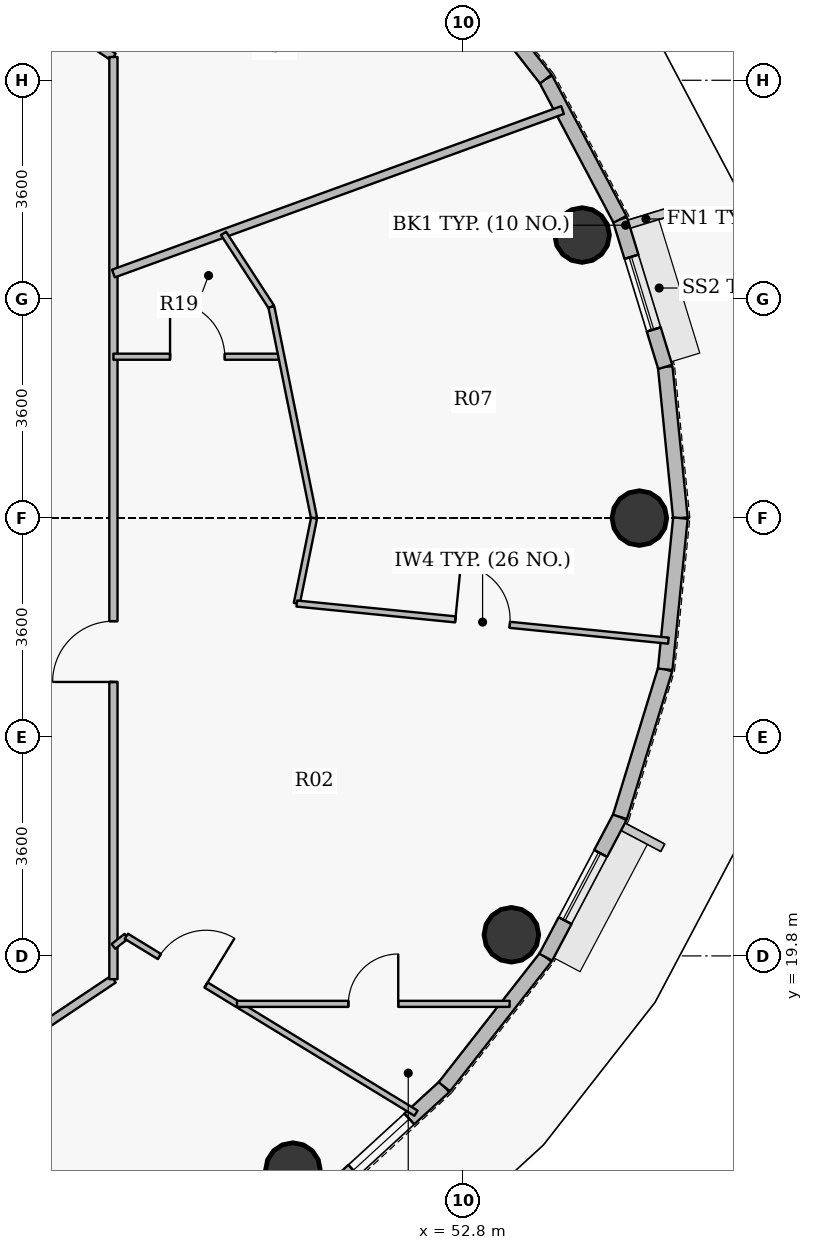
"""IFC4 building model, lengths in metres.
Left out: names, types, materials, properties, quantities, classifications, styles, units other than length and angle.
Written with IfcOpenShell. Run it as: python <this file> out.ifc"""

import sys

from ifc_helpers import new_model, si_unit, direction, frame, frame_2d, origin, origin_2d, place, context, subcontext, project, spatial, rectangle, hollow_circle, extrude, source, transform, mapped, element, fill, save


model = new_model("IFC4")
c1 = context("Model", 3, precision=1e-05, world=origin(), true_north=direction((0.0, 1.0)))
c2 = subcontext(c1, "Body", "Model", "MODEL_VIEW")
j1 = project(units=[si_unit("LENGTHUNIT", "METRE"), si_unit("PLANEANGLEUNIT", "RADIAN")], contexts=[c1])
p1 = place(None, origin())
s1 = spatial("IfcSite", under=j1, at=p1, CompositionType="ELEMENT")
p2 = place(p1, origin())
s2 = spatial("IfcBuilding", under=s1, at=p2, CompositionType="ELEMENT")
p3 = place(p2, frame((0.0, 0.0, 324.0)))
s3 = spatial("IfcBuildingStorey", under=s2, at=p3, CompositionType="ELEMENT", Elevation=324.0)
for number, where, z_axis, x_axis in (
    (1, (55.7, 27.0, -0.25), (0.0, 0.0, 1.0), (1.0, 0.0, 0.0)),
    (2, (54.758, 31.655, -0.25), (0.0, 0.0, 1.0), (1.0, 0.0, 0.0)),
    (3, (50.002, 16.277, -0.25), (0.0, 0.0, 1.0), (1.0, 0.0, 0.0)),
    (4, (53.595, 20.147, -0.25), (0.0, 0.0, 1.0), (1.0, 0.0, 0.0)),
):
    element("IfcColumn", number, at=place(p3, frame(where, z_axis=z_axis, x_axis=x_axis)), inside=s3, PredefinedType="COLUMN", context=c2, shape_type="SweptSolid", body=[
        extrude(hollow_circle(Radius=0.45, WallThickness=0.028, at=origin_2d()), origin(), (0.0, 0.0, 1.0), 4.05),
    ])
p4 = place(p3, frame((56.125, 29.487, 0.0), z_axis=(0.0, 0.0, 1.0), x_axis=(0.100025963401, -0.994984827344, 0.0)))
e5 = element("IfcWall", 5, at=p4, inside=s3, PredefinedType="SOLIDWALL", context=c2, shape_type="SweptSolid", body=[
    extrude(rectangle(XDim=2.499, YDim=0.24, at=frame_2d((1.25, 0.0))), origin(), (0.0, 0.0, 1.0), 3.55),
])
p5 = place(p3, frame((55.381, 31.913, 0.0), z_axis=(0.0, 0.0, 1.0), x_axis=(0.293105547213, -0.956080089842, 0.0)))
e6 = element("IfcWall", 6, at=p5, inside=s3, PredefinedType="SOLIDWALL", context=c2, shape_type="SweptSolid", body=[
    extrude(rectangle(XDim=2.538, YDim=0.24, at=frame_2d((1.269, 0.0))), origin(), (0.0, 0.0, 1.0), 3.55),
])
p6 = place(p5, frame((0.644, 0.0, 0.9)))
e7 = element("IfcOpeningElement", 7, at=p6, cuts=e6, PredefinedType="OPENING", context=c2, shape_type="SweptSolid", body=[
    extrude(rectangle(XDim=1.25, YDim=1.65, at=origin_2d()), frame((0.625, 0.13, 0.825), z_axis=(0.0, -1.0, 0.0), x_axis=(1.0, 0.0, 0.0)), (0.0, 0.0, 1.0), 0.26),
])
p7 = place(p3, frame((54.161, 34.221, 0.0), z_axis=(0.0, 0.0, 1.0), x_axis=(0.467487999989, -0.883999417345, 0.0)))
e8 = element("IfcWall", 8, at=p7, inside=s3, PredefinedType="SOLIDWALL", context=c2, shape_type="SweptSolid", body=[
    extrude(rectangle(XDim=2.61, YDim=0.24, at=frame_2d((1.305, 0.0))), origin(), (0.0, 0.0, 1.0), 3.55),
])
p8 = place(p3, frame((52.493, 36.352, 0.0), z_axis=(0.0, 0.0, 1.0), x_axis=(0.616286367698, -0.78752213492, 0.0)))
e9 = element("IfcWall", 9, at=p8, inside=s3, PredefinedType="SOLIDWALL", context=c2, shape_type="SweptSolid", body=[
    extrude(rectangle(XDim=2.706, YDim=0.24, at=frame_2d((1.353, 0.0))), origin(), (0.0, 0.0, 1.0), 3.55),
])
p9 = place(p3, frame((52.493, 17.648, 0.0), z_axis=(0.0, 0.0, 1.0), x_axis=(-0.737020907932, -0.675869944051, 0.0)))
e10 = element("IfcWall", 10, at=p9, inside=s3, PredefinedType="SOLIDWALL", context=c2, shape_type="SweptSolid", body=[
    extrude(rectangle(XDim=2.815, YDim=0.24, at=frame_2d((1.407, 0.0))), origin(), (0.0, 0.0, 1.0), 3.55),
])
p10 = place(p9, frame((0.783, 0.0, 0.9)))
e11 = element("IfcOpeningElement", 11, at=p10, cuts=e10, PredefinedType="OPENING", context=c2, shape_type="SweptSolid", body=[
    extrude(rectangle(XDim=1.25, YDim=1.65, at=origin_2d()), frame((0.625, 0.13, 0.825), z_axis=(0.0, -1.0, 0.0), x_axis=(1.0, 0.0, 0.0)), (0.0, 0.0, 1.0), 0.26),
])
p11 = place(p3, frame((54.161, 19.779, 0.0), z_axis=(0.0, 0.0, 1.0), x_axis=(-0.616286367698, -0.78752213492, 0.0)))
e12 = element("IfcWall", 12, at=p11, inside=s3, PredefinedType="SOLIDWALL", context=c2, shape_type="SweptSolid", body=[
    extrude(rectangle(XDim=2.706, YDim=0.24, at=frame_2d((1.353, 0.0))), origin(), (0.0, 0.0, 1.0), 3.55),
])
p12 = place(p3, frame((55.381, 22.087, 0.0), z_axis=(0.0, 0.0, 1.0), x_axis=(-0.467487999989, -0.883999417345, 0.0)))
e13 = element("IfcWall", 13, at=p12, inside=s3, PredefinedType="SOLIDWALL", context=c2, shape_type="SweptSolid", body=[
    extrude(rectangle(XDim=2.61, YDim=0.24, at=frame_2d((1.305, 0.0))), origin(), (0.0, 0.0, 1.0), 3.55),
])
p13 = place(p12, frame((0.68, 0.0, 0.9)))
e14 = element("IfcOpeningElement", 14, at=p13, cuts=e13, PredefinedType="OPENING", context=c2, shape_type="SweptSolid", body=[
    extrude(rectangle(XDim=1.25, YDim=1.65, at=origin_2d()), frame((0.625, 0.13, 0.825), z_axis=(0.0, -1.0, 0.0), x_axis=(1.0, 0.0, 0.0)), (0.0, 0.0, 1.0), 0.26),
])
p14 = place(p3, frame((56.125, 24.513, 0.0), z_axis=(0.0, 0.0, 1.0), x_axis=(-0.293105547213, -0.956080089842, 0.0)))
e15 = element("IfcWall", 15, at=p14, inside=s3, PredefinedType="SOLIDWALL", context=c2, shape_type="SweptSolid", body=[
    extrude(rectangle(XDim=2.538, YDim=0.24, at=frame_2d((1.269, 0.0))), origin(), (0.0, 0.0, 1.0), 3.55),
])
p15 = place(p3, frame((56.375, 27.0, 0.0), z_axis=(0.0, 0.0, 1.0), x_axis=(-0.100025963401, -0.994984827344, 0.0)))
e16 = element("IfcWall", 16, at=p15, inside=s3, PredefinedType="SOLIDWALL", context=c2, shape_type="SweptSolid", body=[
    extrude(rectangle(XDim=2.499, YDim=0.24, at=frame_2d((1.25, 0.0))), origin(), (0.0, 0.0, 1.0), 3.55),
])
for number, where, z_axis, x_axis in (
    (17, (45.541, 18.408, 0.0), (0.0, 0.0, 1.0), (0.831, 0.556, 0.0)),
    (18, (45.541, 35.592, 0.0), (0.0, 0.0, 1.0), (0.831, -0.556, 0.0)),
):
    element("IfcWall", number, at=place(p3, frame(where, z_axis=z_axis, x_axis=x_axis)), inside=s3, PredefinedType="PARTITIONING", context=c2, shape_type="SweptSolid", body=[
        extrude(rectangle(XDim=1.815, YDim=0.135, at=frame_2d((0.908, 0.0))), origin(), (0.0, 0.0, 1.0), 3.085),
    ])
p16 = place(p3, frame((47.05, 19.417, 0.0), z_axis=(0.0, 0.0, 1.0), x_axis=(0.0, 1.0, 0.0)))
e19 = element("IfcWall", 19, at=p16, inside=s3, PredefinedType="PARTITIONING", context=c2, shape_type="SweptSolid", body=[
    extrude(rectangle(XDim=15.165, YDim=0.135, at=frame_2d((7.583, 0.0))), origin(), (0.0, 0.0, 1.0), 3.085),
])
p17 = place(p16, frame((4.888, 0.0, 0.0)))
e20 = element("IfcOpeningElement", 20, at=p17, cuts=e19, PredefinedType="OPENING", context=c2, shape_type="SweptSolid", body=[
    extrude(rectangle(XDim=1.0, YDim=2.15, at=origin_2d()), frame((0.5, 0.078, 1.075), z_axis=(0.0, -1.0, 0.0), x_axis=(1.0, 0.0, 0.0)), (0.0, 0.0, 1.0), 0.155),
])
p18 = place(p3, frame((47.05, 19.956, 0.0), z_axis=(0.0, 0.0, 1.0), x_axis=(0.787352373383, 0.616503236105, 0.0)))
e21 = element("IfcWall", 21, at=p18, inside=s3, PredefinedType="PARTITIONING", context=c2, shape_type="SweptSolid", body=[
    extrude(rectangle(XDim=0.27, YDim=0.1, at=frame_2d((0.135, 0.0))), origin(), (0.0, 0.0, 1.0), 3.55),
])
p19 = place(p3, frame((47.05, 29.654, 0.0), z_axis=(0.0, 0.0, 1.0), x_axis=(1.0, 0.0, 0.0)))
e22 = element("IfcWall", 22, at=p19, inside=s3, PredefinedType="PARTITIONING", context=c2, shape_type="SweptSolid", body=[
    extrude(rectangle(XDim=2.763, YDim=0.1, at=frame_2d((1.382, 0.0))), origin(), (0.0, 0.0, 1.0), 3.085),
])
p20 = place(p19, frame((0.932, 0.0, 0.0)))
e23 = element("IfcOpeningElement", 23, at=p20, cuts=e22, PredefinedType="OPENING", context=c2, shape_type="SweptSolid", body=[
    extrude(rectangle(XDim=0.9, YDim=2.1, at=origin_2d()), frame((0.45, 0.06, 1.05), z_axis=(0.0, -1.0, 0.0), x_axis=(1.0, 0.0, 0.0)), (0.0, 0.0, 1.0), 0.12),
])
p21 = place(p3, frame((47.05, 31.022, 0.0), z_axis=(0.0, 0.0, 1.0), x_axis=(0.939701798546, 0.341994926584, 0.0)))
e24 = element("IfcWall", 24, at=p21, inside=s3, PredefinedType="PARTITIONING", context=c2, shape_type="SweptSolid", body=[
    extrude(rectangle(XDim=7.86, YDim=0.135, at=frame_2d((3.93, 0.0))), origin(), (0.0, 0.0, 1.0), 3.035),
])
p22 = place(p3, frame((47.263, 20.123, 0.0), z_axis=(0.0, 0.0, 1.0), x_axis=(0.853468822161, -0.521143904886, 0.0)))
e25 = element("IfcWall", 25, at=p22, inside=s3, PredefinedType="PARTITIONING", context=c2, shape_type="SweptSolid", body=[
    extrude(rectangle(XDim=5.582, YDim=0.1, at=frame_2d((2.791, 0.0))), origin(), (0.0, 0.0, 1.0), 3.035),
])
p23 = place(p22, frame((0.636, 0.0, 0.0)))
e26 = element("IfcOpeningElement", 26, at=p23, cuts=e25, PredefinedType="OPENING", context=c2, shape_type="SweptSolid", body=[
    extrude(rectangle(XDim=0.9, YDim=2.1, at=origin_2d()), frame((0.45, 0.06, 1.05), z_axis=(0.0, -1.0, 0.0), x_axis=(1.0, 0.0, 0.0)), (0.0, 0.0, 1.0), 0.12),
])
p24 = place(p3, frame((48.862, 31.681, 0.0), z_axis=(0.0, 0.0, 1.0), x_axis=(0.545363345365, -0.838199750377, 0.0)))
e27 = element("IfcWall", 27, at=p24, inside=s3, PredefinedType="PARTITIONING", context=c2, shape_type="SweptSolid", body=[
    extrude(rectangle(XDim=1.441, YDim=0.1, at=frame_2d((0.721, 0.0))), origin(), (0.0, 0.0, 1.0), 3.085),
])
p25 = place(p3, frame((49.082, 19.011, 0.0), z_axis=(0.0, 0.0, 1.0), x_axis=(1.0, 0.0, 0.0)))
e28 = element("IfcWall", 28, at=p25, inside=s3, PredefinedType="PARTITIONING", context=c2, shape_type="SweptSolid", body=[
    extrude(rectangle(XDim=4.484, YDim=0.1, at=frame_2d((2.242, 0.0))), origin(), (0.0, 0.0, 1.0), 3.035),
])
p26 = place(p25, frame((1.832, 0.0, 0.0)))
e29 = element("IfcOpeningElement", 29, at=p26, cuts=e28, PredefinedType="OPENING", context=c2, shape_type="SweptSolid", body=[
    extrude(rectangle(XDim=0.82, YDim=2.1, at=origin_2d()), frame((0.41, 0.06, 1.05), z_axis=(0.0, -1.0, 0.0), x_axis=(1.0, 0.0, 0.0)), (0.0, 0.0, 1.0), 0.12),
])
p27 = place(p3, frame((49.648, 30.473, 0.0), z_axis=(0.0, 0.0, 1.0), x_axis=(0.198182976535, -0.980165041109, 0.0)))
e30 = element("IfcWall", 30, at=p27, inside=s3, PredefinedType="PARTITIONING", context=c2, shape_type="SweptSolid", body=[
    extrude(rectangle(XDim=3.543, YDim=0.1, at=frame_2d((1.771, 0.0))), origin(), (0.0, 0.0, 1.0), 3.085),
])
p28 = place(p3, frame((50.066, 25.595, 0.0), z_axis=(0.0, 0.0, 1.0), x_axis=(0.198211500043, 0.980159273409, 0.0)))
e31 = element("IfcWall", 31, at=p28, inside=s3, PredefinedType="PARTITIONING", context=c2, shape_type="SweptSolid", body=[
    extrude(rectangle(XDim=1.434, YDim=0.1, at=frame_2d((0.717, 0.0))), origin(), (0.0, 0.0, 1.0), 3.085),
])
p29 = place(p3, frame((50.066, 25.595, 0.0), z_axis=(0.0, 0.0, 1.0), x_axis=(0.995050169207, -0.099373843447, 0.0)))
e32 = element("IfcWall", 32, at=p29, inside=s3, PredefinedType="PARTITIONING", context=c2, shape_type="SweptSolid", body=[
    extrude(rectangle(XDim=6.142, YDim=0.1, at=frame_2d((3.071, 0.0))), origin(), (0.0, 0.0, 1.0), 3.035),
])
p30 = place(p29, frame((2.621, 0.0, 0.0)))
e33 = element("IfcOpeningElement", 33, at=p30, cuts=e32, PredefinedType="OPENING", context=c2, shape_type="SweptSolid", body=[
    extrude(rectangle(XDim=0.9, YDim=2.1, at=origin_2d()), frame((0.45, 0.06, 1.05), z_axis=(0.0, -1.0, 0.0), x_axis=(1.0, 0.0, 0.0)), (0.0, 0.0, 1.0), 0.12),
])
m1 = source(origin(), c2, "Body", "SweptSolid", [
    extrude(rectangle(XDim=1.25, YDim=1.65, at=origin_2d()), frame((0.625, 0.03, 0.825), z_axis=(0.0, -1.0, 0.0), x_axis=(1.0, 0.0, 0.0)), (0.0, 0.0, 1.0), 0.06),
])
p31 = place(p10, origin())
e34 = element("IfcWindow", 34, at=p31, inside=s3, PartitioningType="SINGLE_PANEL", PredefinedType="WINDOW", context=c2, shape_type="MappedRepresentation", body=[
    mapped(m1, transform((0.0, 0.0, 0.0), x_axis=(1.0, 0.0, 0.0), y_axis=(0.0, 1.0, 0.0), z_axis=(0.0, 0.0, 1.0), scale=1.0)),
])
fill(e11, e34)
p32 = place(p13, origin())
e35 = element("IfcWindow", 35, at=p32, inside=s3, PartitioningType="SINGLE_PANEL", PredefinedType="WINDOW", context=c2, shape_type="MappedRepresentation", body=[
    mapped(m1, transform((0.0, 0.0, 0.0), x_axis=(1.0, 0.0, 0.0), y_axis=(0.0, 1.0, 0.0), z_axis=(0.0, 0.0, 1.0), scale=1.0)),
])
fill(e14, e35)
p33 = place(p6, origin())
e36 = element("IfcWindow", 36, at=p33, inside=s3, PartitioningType="SINGLE_PANEL", PredefinedType="WINDOW", context=c2, shape_type="MappedRepresentation", body=[
    mapped(m1, transform((0.0, 0.0, 0.0), x_axis=(1.0, 0.0, 0.0), y_axis=(0.0, 1.0, 0.0), z_axis=(0.0, 0.0, 1.0), scale=1.0)),
])
fill(e7, e36)
m2 = source(origin(), c2, "Body", "SweptSolid", [
    extrude(rectangle(XDim=1.0, YDim=2.15, at=origin_2d()), frame((0.5, 0.025, 1.075), z_axis=(0.0, -1.0, 0.0), x_axis=(1.0, 0.0, 0.0)), (0.0, 0.0, 1.0), 0.05),
])
p34 = place(p17, origin())
e37 = element("IfcDoor", 37, at=p34, inside=s3, OperationType="SINGLE_SWING_LEFT", PredefinedType="DOOR", context=c2, shape_type="MappedRepresentation", body=[
    mapped(m2, transform((0.0, 0.0, 0.0), x_axis=(1.0, 0.0, 0.0), y_axis=(0.0, 1.0, 0.0), z_axis=(0.0, 0.0, 1.0), scale=1.0)),
])
fill(e20, e37)
m3 = source(origin(), c2, "Body", "SweptSolid", [
    extrude(rectangle(XDim=0.9, YDim=2.1, at=origin_2d()), frame((0.45, 0.025, 1.05), z_axis=(0.0, -1.0, 0.0), x_axis=(1.0, 0.0, 0.0)), (0.0, 0.0, 1.0), 0.05),
])
p35 = place(p23, origin())
e38 = element("IfcDoor", 38, at=p35, inside=s3, OperationType="SINGLE_SWING_RIGHT", PredefinedType="DOOR", context=c2, shape_type="MappedRepresentation", body=[
    mapped(m3, transform((0.0, 0.0, 0.0), x_axis=(1.0, 0.0, 0.0), y_axis=(0.0, 1.0, 0.0), z_axis=(0.0, 0.0, 1.0), scale=1.0)),
])
fill(e26, e38)
p36 = place(p30, origin())
e39 = element("IfcDoor", 39, at=p36, inside=s3, OperationType="SINGLE_SWING_LEFT", PredefinedType="DOOR", context=c2, shape_type="MappedRepresentation", body=[
    mapped(m3, transform((0.0, 0.0, 0.0), x_axis=(1.0, 0.0, 0.0), y_axis=(0.0, 1.0, 0.0), z_axis=(0.0, 0.0, 1.0), scale=1.0)),
])
fill(e33, e39)
m4 = source(origin(), c2, "Body", "SweptSolid", [
    extrude(rectangle(XDim=0.82, YDim=2.1, at=origin_2d()), frame((0.41, 0.025, 1.05), z_axis=(0.0, -1.0, 0.0), x_axis=(1.0, 0.0, 0.0)), (0.0, 0.0, 1.0), 0.05),
])
p37 = place(p26, origin())
e40 = element("IfcDoor", 40, at=p37, inside=s3, OperationType="SINGLE_SWING_RIGHT", PredefinedType="DOOR", context=c2, shape_type="MappedRepresentation", body=[
    mapped(m4, transform((0.0, 0.0, 0.0), x_axis=(1.0, 0.0, 0.0), y_axis=(0.0, 1.0, 0.0), z_axis=(0.0, 0.0, 1.0), scale=1.0)),
])
fill(e29, e40)
p38 = place(p20, origin())
e41 = element("IfcDoor", 41, at=p38, inside=s3, OperationType="SINGLE_SWING_LEFT", PredefinedType="DOOR", context=c2, shape_type="MappedRepresentation", body=[
    mapped(m3, transform((0.0, 0.0, 0.0), x_axis=(1.0, 0.0, 0.0), y_axis=(0.0, 1.0, 0.0), z_axis=(0.0, 0.0, 1.0), scale=1.0)),
])
fill(e23, e41)
save(model, sys.argv[1])
